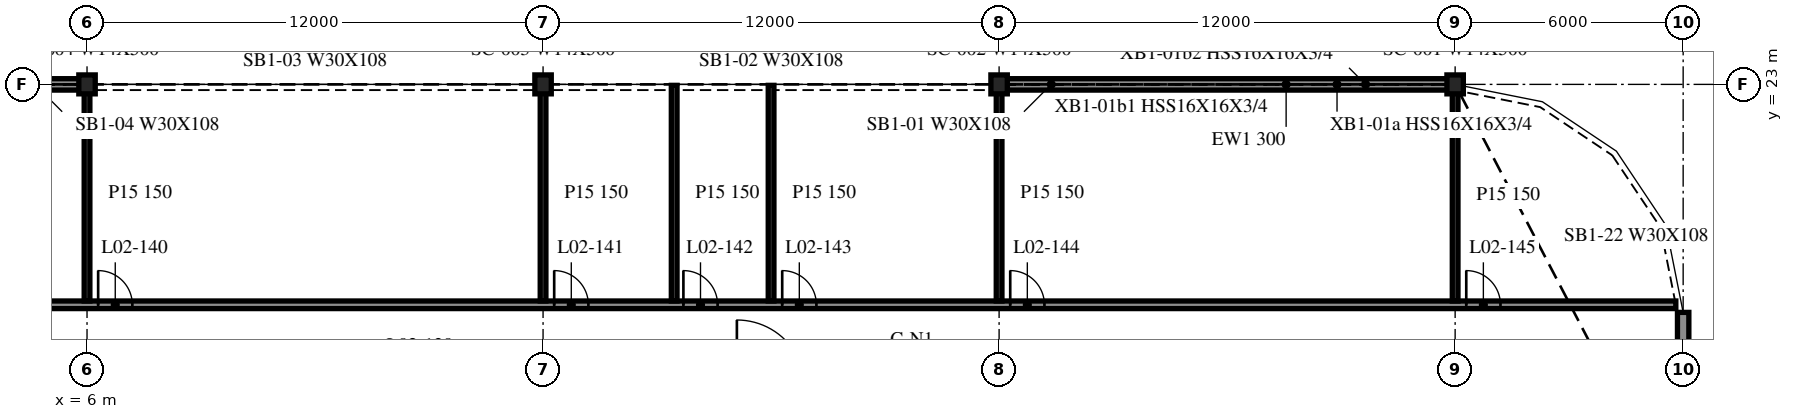
"""IFC4 building model, lengths in metres.
Left out: names, types, materials, properties, quantities, classifications, styles, units other than length and angle.
Written with IfcOpenShell. Run it as: python <this file> out.ifc"""

import sys

from ifc_helpers import new_model, si_unit, direction, frame, frame_2d, origin, origin_2d, place, context, subcontext, project, spatial, rectangle, i_section, extrude, element, fill, save


model = new_model("IFC4")
c1 = context("Model", 3, precision=1e-05, world=origin(), true_north=direction((0.0, 1.0)))
c2 = subcontext(c1, "Body", "Model", "MODEL_VIEW")
j1 = project(units=[si_unit("LENGTHUNIT", "METRE"), si_unit("PLANEANGLEUNIT", "RADIAN")], contexts=[c1])
p1 = place(None, origin())
s1 = spatial("IfcSite", under=j1, at=p1, CompositionType="ELEMENT")
p2 = place(p1, origin())
s2 = spatial("IfcBuilding", under=s1, at=p2, CompositionType="ELEMENT")
p3 = place(p2, frame((0.0, 0.0, 11.5)))
s3 = spatial("IfcBuildingStorey", under=s2, at=p3, CompositionType="ELEMENT", Elevation=11.5)
for number, where, z_axis, x_axis in (
    (1, (42.0, 23.0, -0.34), (0.0, 0.0, 1.0), (1.0, 0.0, 0.0)),
    (2, (30.0, 23.0, -0.34), (0.0, 0.0, 1.0), (1.0, 0.0, 0.0)),
    (3, (18.0, 23.0, -0.34), (0.0, 0.0, 1.0), (1.0, 0.0, 0.0)),
    (4, (6.0, 23.0, -0.34), (0.0, 0.0, 1.0), (1.0, 0.0, 0.0)),
):
    element("IfcColumn", number, at=place(p3, frame(where, z_axis=z_axis, x_axis=x_axis)), inside=s3, PredefinedType="COLUMN", context=c2, shape_type="SweptSolid", body=[
        extrude(i_section(OverallWidth=0.432, OverallDepth=0.498, WebThickness=0.056, FlangeThickness=0.089, at=origin_2d()), origin(), (0.0, 0.0, 1.0), 4.3),
    ])
for number, where, z_axis, x_axis in (
    (5, (41.972, 23.0, 0.0), (0.0, 0.0, 1.0), (-1.0, 0.0, 0.0)),
    (6, (5.972, 23.0, 0.0), (0.0, 0.0, 1.0), (-1.0, 0.0, 0.0)),
):
    element("IfcWall", number, at=place(p3, frame(where, z_axis=z_axis, x_axis=x_axis)), inside=s3, PredefinedType="NOTDEFINED", context=c2, shape_type="SweptSolid", body=[
        extrude(rectangle(XDim=11.944, YDim=0.3, at=frame_2d((5.972, 0.0))), origin(), (0.0, 0.0, 1.0), 3.203),
    ])
p4 = place(p3, frame((48.0, 11.749, 0.0), z_axis=(0.0, 0.0, 1.0), x_axis=(0.0, 1.0, 0.0)))
e7 = element("IfcWall", 7, at=p4, inside=s3, PredefinedType="NOTDEFINED", context=c2, shape_type="SweptSolid", body=[
    extrude(rectangle(XDim=5.251, YDim=0.3, at=frame_2d((2.625, 0.0))), origin(), (0.0, 0.0, 1.0), 3.203),
])
p5 = place(p3, frame((-47.807, 17.2, 0.0), z_axis=(0.0, 0.0, 1.0), x_axis=(1.0, 0.0, 0.0)))
e8 = element("IfcWall", 8, at=p5, inside=s3, PredefinedType="PARTITIONING", context=c2, shape_type="SweptSolid", body=[
    extrude(rectangle(XDim=95.615, YDim=0.2, at=frame_2d((47.807, 0.0))), origin(), (0.0, 0.0, 1.0), 3.96),
])
p6 = place(p5, frame((4.7, 0.0, 0.0)))
e9 = element("IfcOpeningElement", 9, at=p6, cuts=e8, PredefinedType="OPENING", context=c2, shape_type="SweptSolid", body=[
    extrude(rectangle(XDim=0.9, YDim=2.1, at=frame_2d((0.45, 1.05))), frame((0.0, 0.11, 0.0), z_axis=(0.0, -1.0, 0.0), x_axis=(1.0, 0.0, 0.0)), (0.0, 0.0, 1.0), 0.22),
])
p7 = place(p5, frame((16.7, 0.0, 0.0)))
e10 = element("IfcOpeningElement", 10, at=p7, cuts=e8, PredefinedType="OPENING", context=c2, shape_type="SweptSolid", body=[
    extrude(rectangle(XDim=0.9, YDim=2.1, at=frame_2d((0.45, 1.05))), frame((0.0, 0.11, 0.0), z_axis=(0.0, -1.0, 0.0), x_axis=(1.0, 0.0, 0.0)), (0.0, 0.0, 1.0), 0.22),
])
p8 = place(p5, frame((20.1, 0.0, 0.0)))
e11 = element("IfcOpeningElement", 11, at=p8, cuts=e8, PredefinedType="OPENING", context=c2, shape_type="SweptSolid", body=[
    extrude(rectangle(XDim=0.9, YDim=2.1, at=frame_2d((0.45, 1.05))), frame((0.0, 0.11, 0.0), z_axis=(0.0, -1.0, 0.0), x_axis=(1.0, 0.0, 0.0)), (0.0, 0.0, 1.0), 0.22),
])
p9 = place(p5, frame((22.7, 0.0, 0.0)))
e12 = element("IfcOpeningElement", 12, at=p9, cuts=e8, PredefinedType="OPENING", context=c2, shape_type="SweptSolid", body=[
    extrude(rectangle(XDim=0.9, YDim=2.1, at=frame_2d((0.45, 1.05))), frame((0.0, 0.11, 0.0), z_axis=(0.0, -1.0, 0.0), x_axis=(1.0, 0.0, 0.0)), (0.0, 0.0, 1.0), 0.22),
])
p10 = place(p5, frame((28.7, 0.0, 0.0)))
e13 = element("IfcOpeningElement", 13, at=p10, cuts=e8, PredefinedType="OPENING", context=c2, shape_type="SweptSolid", body=[
    extrude(rectangle(XDim=0.9, YDim=2.1, at=frame_2d((0.45, 1.05))), frame((0.0, 0.11, 0.0), z_axis=(0.0, -1.0, 0.0), x_axis=(1.0, 0.0, 0.0)), (0.0, 0.0, 1.0), 0.22),
])
p11 = place(p5, frame((40.7, 0.0, 0.0)))
e14 = element("IfcOpeningElement", 14, at=p11, cuts=e8, PredefinedType="OPENING", context=c2, shape_type="SweptSolid", body=[
    extrude(rectangle(XDim=0.9, YDim=2.1, at=frame_2d((0.45, 1.05))), frame((0.0, 0.11, 0.0), z_axis=(0.0, -1.0, 0.0), x_axis=(1.0, 0.0, 0.0)), (0.0, 0.0, 1.0), 0.22),
])
p12 = place(p5, frame((44.1, 0.0, 0.0)))
e15 = element("IfcOpeningElement", 15, at=p12, cuts=e8, PredefinedType="OPENING", context=c2, shape_type="SweptSolid", body=[
    extrude(rectangle(XDim=0.9, YDim=2.1, at=frame_2d((0.45, 1.05))), frame((0.0, 0.11, 0.0), z_axis=(0.0, -1.0, 0.0), x_axis=(1.0, 0.0, 0.0)), (0.0, 0.0, 1.0), 0.22),
])
p13 = place(p5, frame((46.7, 0.0, 0.0)))
e16 = element("IfcOpeningElement", 16, at=p13, cuts=e8, PredefinedType="OPENING", context=c2, shape_type="SweptSolid", body=[
    extrude(rectangle(XDim=0.9, YDim=2.1, at=frame_2d((0.45, 1.05))), frame((0.0, 0.11, 0.0), z_axis=(0.0, -1.0, 0.0), x_axis=(1.0, 0.0, 0.0)), (0.0, 0.0, 1.0), 0.22),
])
p14 = place(p5, frame((48.1, 0.0, 0.0)))
e17 = element("IfcOpeningElement", 17, at=p14, cuts=e8, PredefinedType="OPENING", context=c2, shape_type="SweptSolid", body=[
    extrude(rectangle(XDim=0.9, YDim=2.1, at=frame_2d((0.45, 1.05))), frame((0.0, 0.11, 0.0), z_axis=(0.0, -1.0, 0.0), x_axis=(1.0, 0.0, 0.0)), (0.0, 0.0, 1.0), 0.22),
])
p15 = place(p5, frame((54.1, 0.0, 0.0)))
e18 = element("IfcOpeningElement", 18, at=p15, cuts=e8, PredefinedType="OPENING", context=c2, shape_type="SweptSolid", body=[
    extrude(rectangle(XDim=0.9, YDim=2.1, at=frame_2d((0.45, 1.05))), frame((0.0, 0.11, 0.0), z_axis=(0.0, -1.0, 0.0), x_axis=(1.0, 0.0, 0.0)), (0.0, 0.0, 1.0), 0.22),
])
p16 = place(p5, frame((66.1, 0.0, 0.0)))
e19 = element("IfcOpeningElement", 19, at=p16, cuts=e8, PredefinedType="OPENING", context=c2, shape_type="SweptSolid", body=[
    extrude(rectangle(XDim=0.9, YDim=2.1, at=frame_2d((0.45, 1.05))), frame((0.0, 0.11, 0.0), z_axis=(0.0, -1.0, 0.0), x_axis=(1.0, 0.0, 0.0)), (0.0, 0.0, 1.0), 0.22),
])
p17 = place(p5, frame((69.5, 0.0, 0.0)))
e20 = element("IfcOpeningElement", 20, at=p17, cuts=e8, PredefinedType="OPENING", context=c2, shape_type="SweptSolid", body=[
    extrude(rectangle(XDim=0.9, YDim=2.1, at=frame_2d((0.45, 1.05))), frame((0.0, 0.11, 0.0), z_axis=(0.0, -1.0, 0.0), x_axis=(1.0, 0.0, 0.0)), (0.0, 0.0, 1.0), 0.22),
])
p18 = place(p5, frame((72.1, 0.0, 0.0)))
e21 = element("IfcOpeningElement", 21, at=p18, cuts=e8, PredefinedType="OPENING", context=c2, shape_type="SweptSolid", body=[
    extrude(rectangle(XDim=0.9, YDim=2.1, at=frame_2d((0.45, 1.05))), frame((0.0, 0.11, 0.0), z_axis=(0.0, -1.0, 0.0), x_axis=(1.0, 0.0, 0.0)), (0.0, 0.0, 1.0), 0.22),
])
p19 = place(p5, frame((78.1, 0.0, 0.0)))
e22 = element("IfcOpeningElement", 22, at=p19, cuts=e8, PredefinedType="OPENING", context=c2, shape_type="SweptSolid", body=[
    extrude(rectangle(XDim=0.9, YDim=2.1, at=frame_2d((0.45, 1.05))), frame((0.0, 0.11, 0.0), z_axis=(0.0, -1.0, 0.0), x_axis=(1.0, 0.0, 0.0)), (0.0, 0.0, 1.0), 0.22),
])
p20 = place(p5, frame((90.1, 0.0, 0.0)))
e23 = element("IfcOpeningElement", 23, at=p20, cuts=e8, PredefinedType="OPENING", context=c2, shape_type="SweptSolid", body=[
    extrude(rectangle(XDim=0.9, YDim=2.1, at=frame_2d((0.45, 1.05))), frame((0.0, 0.11, 0.0), z_axis=(0.0, -1.0, 0.0), x_axis=(1.0, 0.0, 0.0)), (0.0, 0.0, 1.0), 0.22),
])
for number, where, z_axis, x_axis in (
    (24, (6.0, 17.3, 0.0), (0.0, 0.0, 1.0), (0.0, 1.0, 0.0)),
    (25, (18.0, 17.3, 0.0), (0.0, 0.0, 1.0), (0.0, 1.0, 0.0)),
    (26, (21.45, 17.3, 0.0), (0.0, 0.0, 1.0), (0.0, 1.0, 0.0)),
    (27, (24.0, 17.3, 0.0), (0.0, 0.0, 1.0), (0.0, 1.0, 0.0)),
    (28, (30.0, 17.3, 0.0), (0.0, 0.0, 1.0), (0.0, 1.0, 0.0)),
):
    element("IfcWall", number, at=place(p3, frame(where, z_axis=z_axis, x_axis=x_axis)), inside=s3, PredefinedType="PARTITIONING", context=c2, shape_type="SweptSolid", body=[
        extrude(rectangle(XDim=5.675, YDim=0.15, at=frame_2d((2.837, 0.0))), origin(), (0.0, 0.0, 1.0), 3.96),
    ])
p21 = place(p3, frame((42.0, 17.3, 0.0), z_axis=(0.0, 0.0, 1.0), x_axis=(0.0, 1.0, 0.0)))
e29 = element("IfcWall", 29, at=p21, inside=s3, PredefinedType="PARTITIONING", context=c2, shape_type="SweptSolid", body=[
    extrude(rectangle(XDim=5.547, YDim=0.15, at=frame_2d((2.773, 0.0))), origin(), (0.0, 0.0, 1.0), 3.96),
])
p22 = place(p15, origin())
e30 = element("IfcDoor", 30, at=p22, inside=s3, OperationType="SINGLE_SWING_RIGHT", PredefinedType="DOOR", context=c2, shape_type="SweptSolid", body=[
    extrude(rectangle(XDim=0.9, YDim=2.1, at=frame_2d((0.45, 1.05))), frame((0.0, 0.025, 0.0), z_axis=(0.0, -1.0, 0.0), x_axis=(1.0, 0.0, 0.0)), (0.0, 0.0, 1.0), 0.05),
])
fill(e18, e30)
p23 = place(p16, origin())
e31 = element("IfcDoor", 31, at=p23, inside=s3, OperationType="SINGLE_SWING_RIGHT", PredefinedType="DOOR", context=c2, shape_type="SweptSolid", body=[
    extrude(rectangle(XDim=0.9, YDim=2.1, at=frame_2d((0.45, 1.05))), frame((0.0, 0.025, 0.0), z_axis=(0.0, -1.0, 0.0), x_axis=(1.0, 0.0, 0.0)), (0.0, 0.0, 1.0), 0.05),
])
fill(e19, e31)
p24 = place(p17, origin())
e32 = element("IfcDoor", 32, at=p24, inside=s3, OperationType="SINGLE_SWING_RIGHT", PredefinedType="DOOR", context=c2, shape_type="SweptSolid", body=[
    extrude(rectangle(XDim=0.9, YDim=2.1, at=frame_2d((0.45, 1.05))), frame((0.0, 0.025, 0.0), z_axis=(0.0, -1.0, 0.0), x_axis=(1.0, 0.0, 0.0)), (0.0, 0.0, 1.0), 0.05),
])
fill(e20, e32)
p25 = place(p18, origin())
e33 = element("IfcDoor", 33, at=p25, inside=s3, OperationType="SINGLE_SWING_RIGHT", PredefinedType="DOOR", context=c2, shape_type="SweptSolid", body=[
    extrude(rectangle(XDim=0.9, YDim=2.1, at=frame_2d((0.45, 1.05))), frame((0.0, 0.025, 0.0), z_axis=(0.0, -1.0, 0.0), x_axis=(1.0, 0.0, 0.0)), (0.0, 0.0, 1.0), 0.05),
])
fill(e21, e33)
p26 = place(p19, origin())
e34 = element("IfcDoor", 34, at=p26, inside=s3, OperationType="SINGLE_SWING_RIGHT", PredefinedType="DOOR", context=c2, shape_type="SweptSolid", body=[
    extrude(rectangle(XDim=0.9, YDim=2.1, at=frame_2d((0.45, 1.05))), frame((0.0, 0.025, 0.0), z_axis=(0.0, -1.0, 0.0), x_axis=(1.0, 0.0, 0.0)), (0.0, 0.0, 1.0), 0.05),
])
fill(e22, e34)
p27 = place(p20, origin())
e35 = element("IfcDoor", 35, at=p27, inside=s3, OperationType="SINGLE_SWING_RIGHT", PredefinedType="DOOR", context=c2, shape_type="SweptSolid", body=[
    extrude(rectangle(XDim=0.9, YDim=2.1, at=frame_2d((0.45, 1.05))), frame((0.0, 0.025, 0.0), z_axis=(0.0, -1.0, 0.0), x_axis=(1.0, 0.0, 0.0)), (0.0, 0.0, 1.0), 0.05),
])
fill(e23, e35)
save(model, sys.argv[1])
